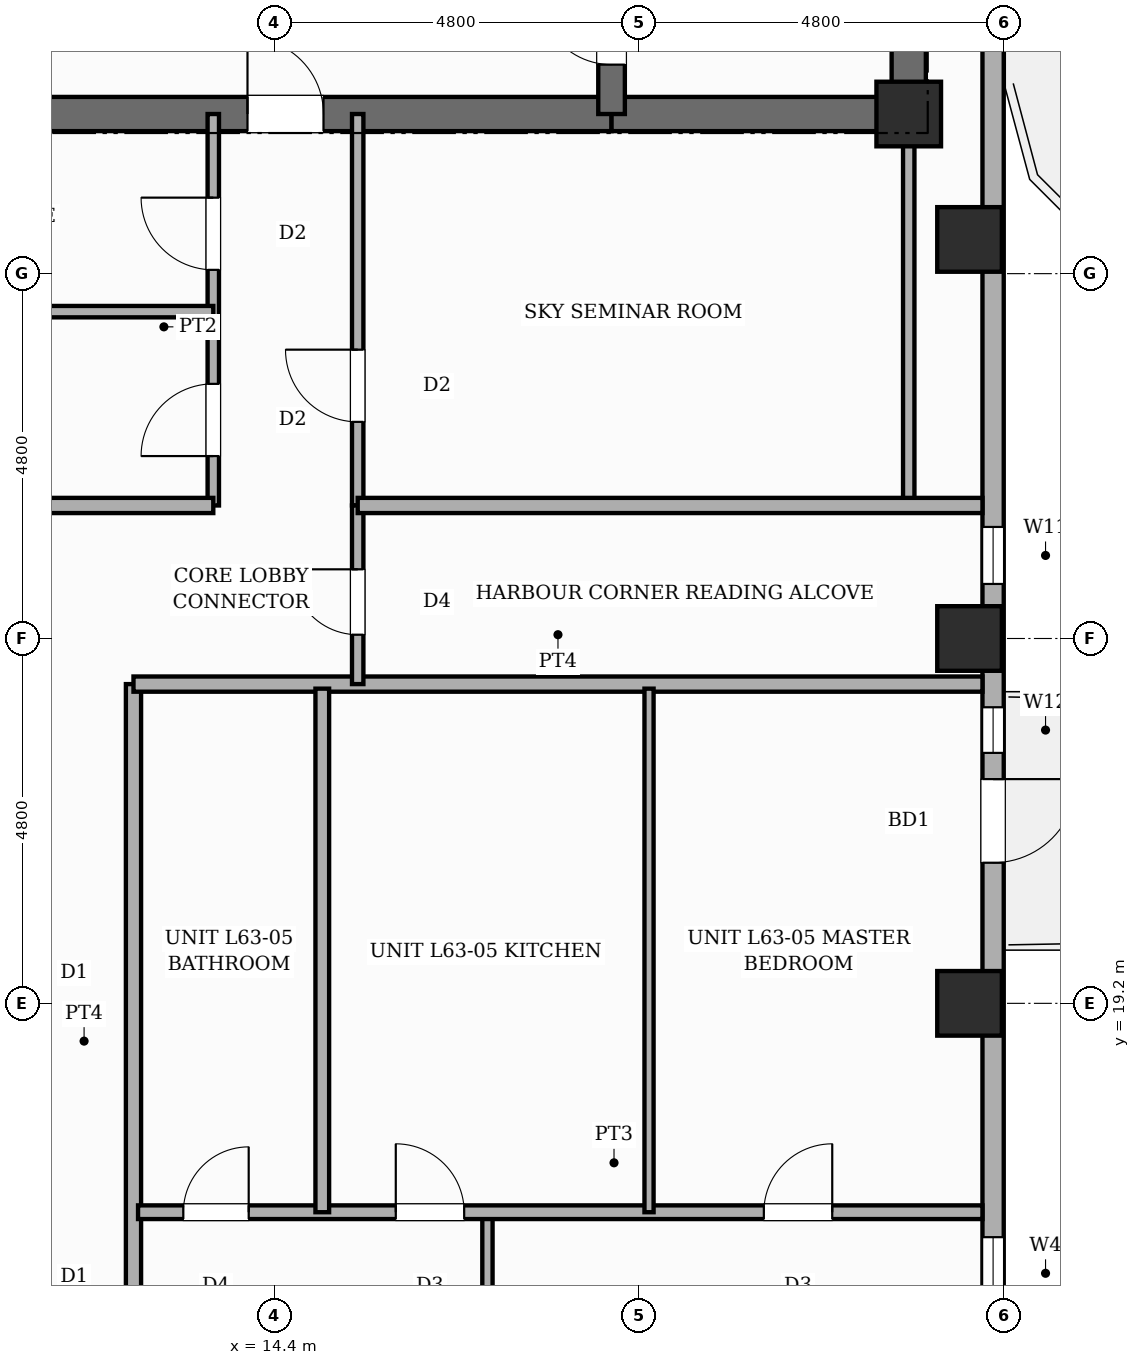
"""IFC4 building model, lengths in metres.
Left out: names, types, materials, properties, quantities, classifications, styles, units other than length and angle.
Written with IfcOpenShell. Run it as: python <this file> out.ifc"""

import sys

from ifc_helpers import new_model, si_unit, direction, frame, frame_2d, origin, origin_2d, place, context, subcontext, project, spatial, rectangle, extrude, element, fill, save


model = new_model("IFC4")
c1 = context("Model", 3, precision=1e-05, world=origin(), true_north=direction((0.0, 1.0)))
c2 = subcontext(c1, "Body", "Model", "MODEL_VIEW")
j1 = project(units=[si_unit("LENGTHUNIT", "METRE"), si_unit("PLANEANGLEUNIT", "RADIAN")], contexts=[c1])
p1 = place(None, origin())
s1 = spatial("IfcSite", under=j1, at=p1, CompositionType="ELEMENT")
p2 = place(p1, origin())
s2 = spatial("IfcBuilding", under=s1, at=p2, CompositionType="ELEMENT")
p3 = place(p2, frame((0.0, 0.0, 239.8)))
s3 = spatial("IfcBuildingStorey", under=s2, at=p3, CompositionType="ELEMENT", Elevation=239.8)
p4 = place(p3, frame((22.75, 30.675, 0.0), z_axis=(0.0, 0.0, 1.0), x_axis=(0.0, 1.0, 0.0)))
e1 = element("IfcWall", 1, at=p4, inside=s3, PredefinedType="SHEAR", context=c2, shape_type="SweptSolid", body=[
    extrude(rectangle(XDim=15.35, YDim=0.45, at=frame_2d((7.675, 0.0))), origin(), (0.0, 0.0, 1.0), 4.3),
])
p5 = place(p3, frame((9.96, 30.9, 0.0), z_axis=(0.0, 0.0, 1.0), x_axis=(1.0, 0.0, 0.0)))
e2 = element("IfcWall", 2, at=p5, inside=s3, PredefinedType="SHEAR", context=c2, shape_type="SweptSolid", body=[
    extrude(rectangle(XDim=8.88, YDim=0.45, at=frame_2d((4.44, 0.0))), origin(), (0.0, 0.0, 1.0), 4.3),
])
p6 = place(p5, frame((4.09, 0.0, 0.0)))
e3 = element("IfcOpeningElement", 3, at=p6, cuts=e2, PredefinedType="OPENING", context=c2, shape_type="SweptSolid", body=[
    extrude(rectangle(XDim=1.0, YDim=2.15, at=frame_2d((0.5, 1.075))), frame((0.0, 0.235, 0.0), z_axis=(0.0, -1.0, 0.0), x_axis=(1.0, 0.0, 0.0)), (0.0, 0.0, 1.0), 0.47),
])
p7 = place(p3, frame((18.84, 30.9, 0.0), z_axis=(0.0, 0.0, 1.0), x_axis=(1.0, 0.0, 0.0)))
e4 = element("IfcWall", 4, at=p7, inside=s3, PredefinedType="SHEAR", context=c2, shape_type="SweptSolid", body=[
    extrude(rectangle(XDim=3.91, YDim=0.45, at=frame_2d((1.955, 0.0))), origin(), (0.0, 0.0, 1.0), 4.3),
])
p8 = place(p3, frame((18.84, 30.9, 0.0), z_axis=(0.0, 0.0, 1.0), x_axis=(0.0, 1.0, 0.0)))
e5 = element("IfcWall", 5, at=p8, inside=s3, PredefinedType="SHEAR", context=c2, shape_type="SweptSolid", body=[
    extrude(rectangle(XDim=14.9, YDim=0.35, at=frame_2d((7.45, 0.0))), origin(), (0.0, 0.0, 1.0), 4.3),
])
p9 = place(p8, frame((0.65, 0.0, 0.0)))
e6 = element("IfcOpeningElement", 6, at=p9, cuts=e5, PredefinedType="OPENING", context=c2, shape_type="SweptSolid", body=[
    extrude(rectangle(XDim=0.95, YDim=2.1, at=frame_2d((0.475, 1.05))), frame((0.0, 0.185, 0.0), z_axis=(0.0, -1.0, 0.0), x_axis=(1.0, 0.0, 0.0)), (0.0, 0.0, 1.0), 0.37),
])
p10 = place(p8, frame((10.45, 0.0, 0.0)))
e7 = element("IfcOpeningElement", 7, at=p10, cuts=e5, PredefinedType="OPENING", context=c2, shape_type="SweptSolid", body=[
    extrude(rectangle(XDim=1.0, YDim=2.15, at=frame_2d((0.5, 1.075))), frame((0.0, 0.185, 0.0), z_axis=(0.0, -1.0, 0.0), x_axis=(1.0, 0.0, 0.0)), (0.0, 0.0, 1.0), 0.37),
])
for number, where, z_axis, x_axis in (
    (8, (22.75, 30.9, 0.0), (0.0, 0.0, 1.0), (1.0, 0.0, 0.0)),
    (9, (23.55, 19.2, 0.0), (0.0, 0.0, 1.0), (1.0, 0.0, 0.0)),
    (10, (23.55, 24.0, 0.0), (0.0, 0.0, 1.0), (1.0, 0.0, 0.0)),
    (11, (23.55, 29.25, 0.0), (0.0, 0.0, 1.0), (1.0, 0.0, 0.0)),
):
    element("IfcColumn", number, at=place(p3, frame(where, z_axis=z_axis, x_axis=x_axis)), inside=s3, PredefinedType="COLUMN", context=c2, shape_type="SweptSolid", body=[
        extrude(rectangle(XDim=0.85, YDim=0.85, at=origin_2d()), origin(), (0.0, 0.0, 1.0), 4.3),
    ])
p11 = place(p3, frame((23.86, 45.6, 0.0), z_axis=(0.0, 0.0, 1.0), x_axis=(0.0, -1.0, 0.0)))
e12 = element("IfcWall", 12, at=p11, inside=s3, PredefinedType="STANDARD", context=c2, shape_type="SweptSolid", body=[
    extrude(rectangle(XDim=33.6, YDim=0.28, at=frame_2d((16.8, 0.0))), origin(), (0.0, 0.0, 1.0), 3.32),
])
p12 = place(p11, frame((3.5, 0.0, 0.0)))
e13 = element("IfcOpeningElement", 13, at=p12, cuts=e12, PredefinedType="OPENING", context=c2, shape_type="SweptSolid", body=[
    extrude(rectangle(XDim=1.3, YDim=2.2, at=frame_2d((0.65, 1.1))), frame((0.0, 0.15, 0.0), z_axis=(0.0, -1.0, 0.0), x_axis=(1.0, 0.0, 0.0)), (0.0, 0.0, 1.0), 0.3),
])
p13 = place(p11, frame((23.45, 0.0, 0.0)))
e14 = element("IfcOpeningElement", 14, at=p13, cuts=e12, PredefinedType="OPENING", context=c2, shape_type="SweptSolid", body=[
    extrude(rectangle(XDim=1.1, YDim=2.15, at=frame_2d((0.55, 1.075))), frame((0.0, 0.15, 0.0), z_axis=(0.0, -1.0, 0.0), x_axis=(1.0, 0.0, 0.0)), (0.0, 0.0, 1.0), 0.3),
])
p14 = place(p11, frame((22.505, 0.0, 0.45)))
e15 = element("IfcOpeningElement", 15, at=p14, cuts=e12, PredefinedType="OPENING", context=c2, shape_type="SweptSolid", body=[
    extrude(rectangle(XDim=0.6, YDim=1.8, at=frame_2d((0.3, 0.9))), frame((0.0, 0.15, 0.0), z_axis=(0.0, -1.0, 0.0), x_axis=(1.0, 0.0, 0.0)), (0.0, 0.0, 1.0), 0.3),
])
p15 = place(p11, frame((0.407, 0.0, 0.8)))
e16 = element("IfcOpeningElement", 16, at=p15, cuts=e12, PredefinedType="OPENING", context=c2, shape_type="SweptSolid", body=[
    extrude(rectangle(XDim=1.2, YDim=1.8, at=frame_2d((0.6, 0.9))), frame((0.0, 0.15, 0.0), z_axis=(0.0, -1.0, 0.0), x_axis=(1.0, 0.0, 0.0)), (0.0, 0.0, 1.0), 0.3),
])
p16 = place(p11, frame((29.477, 0.0, 0.8)))
e17 = element("IfcOpeningElement", 17, at=p16, cuts=e12, PredefinedType="OPENING", context=c2, shape_type="SweptSolid", body=[
    extrude(rectangle(XDim=0.95, YDim=1.8, at=frame_2d((0.475, 0.9))), frame((0.0, 0.15, 0.0), z_axis=(0.0, -1.0, 0.0), x_axis=(1.0, 0.0, 0.0)), (0.0, 0.0, 1.0), 0.3),
])
p17 = place(p11, frame((20.133, 0.0, 0.45)))
e18 = element("IfcOpeningElement", 18, at=p17, cuts=e12, PredefinedType="OPENING", context=c2, shape_type="SweptSolid", body=[
    extrude(rectangle(XDim=0.75, YDim=1.8, at=frame_2d((0.375, 0.9))), frame((0.0, 0.15, 0.0), z_axis=(0.0, -1.0, 0.0), x_axis=(1.0, 0.0, 0.0)), (0.0, 0.0, 1.0), 0.3),
])
p18 = place(p3, frame((13.6, 25.75, 0.0), z_axis=(0.0, 0.0, 1.0), x_axis=(0.0, 1.0, 0.0)))
e19 = element("IfcWall", 19, at=p18, inside=s3, PredefinedType="PARTITIONING", context=c2, shape_type="SweptSolid", body=[
    extrude(rectangle(XDim=5.15, YDim=0.15, at=frame_2d((2.575, 0.0))), origin(), (0.0, 0.0, 1.0), 4.04),
])
p19 = place(p18, frame((0.65, 0.0, 0.0)))
e20 = element("IfcOpeningElement", 20, at=p19, cuts=e19, PredefinedType="OPENING", context=c2, shape_type="SweptSolid", body=[
    extrude(rectangle(XDim=0.95, YDim=2.15, at=frame_2d((0.475, 1.075))), frame((0.0, 0.085, 0.0), z_axis=(0.0, -1.0, 0.0), x_axis=(1.0, 0.0, 0.0)), (0.0, 0.0, 1.0), 0.17),
])
p20 = place(p18, frame((3.1, 0.0, 0.0)))
e21 = element("IfcOpeningElement", 21, at=p20, cuts=e19, PredefinedType="OPENING", context=c2, shape_type="SweptSolid", body=[
    extrude(rectangle(XDim=0.95, YDim=2.15, at=frame_2d((0.475, 1.075))), frame((0.0, 0.085, 0.0), z_axis=(0.0, -1.0, 0.0), x_axis=(1.0, 0.0, 0.0)), (0.0, 0.0, 1.0), 0.17),
])
p21 = place(p3, frame((15.5, 25.75, 0.0), z_axis=(0.0, 0.0, 1.0), x_axis=(0.0, 1.0, 0.0)))
e22 = element("IfcWall", 22, at=p21, inside=s3, PredefinedType="PARTITIONING", context=c2, shape_type="SweptSolid", body=[
    extrude(rectangle(XDim=5.15, YDim=0.15, at=frame_2d((2.575, 0.0))), origin(), (0.0, 0.0, 1.0), 4.04),
])
p22 = place(p21, frame((1.1, 0.0, 0.0)))
e23 = element("IfcOpeningElement", 23, at=p22, cuts=e22, PredefinedType="OPENING", context=c2, shape_type="SweptSolid", body=[
    extrude(rectangle(XDim=0.95, YDim=2.15, at=frame_2d((0.475, 1.075))), frame((0.0, 0.085, 0.0), z_axis=(0.0, -1.0, 0.0), x_axis=(1.0, 0.0, 0.0)), (0.0, 0.0, 1.0), 0.17),
])
p23 = place(p3, frame((22.75, 25.75, 0.0), z_axis=(0.0, 0.0, 1.0), x_axis=(0.0, 1.0, 0.0)))
e24 = element("IfcWall", 24, at=p23, inside=s3, PredefinedType="PARTITIONING", context=c2, shape_type="SweptSolid", body=[
    extrude(rectangle(XDim=5.15, YDim=0.15, at=frame_2d((2.575, 0.0))), origin(), (0.0, 0.0, 1.0), 4.04),
])
p24 = place(p3, frame((6.05, 28.3, 0.0), z_axis=(0.0, 0.0, 1.0), x_axis=(1.0, 0.0, 0.0)))
e25 = element("IfcWall", 25, at=p24, inside=s3, PredefinedType="PARTITIONING", context=c2, shape_type="SweptSolid", body=[
    extrude(rectangle(XDim=7.55, YDim=0.15, at=frame_2d((3.775, 0.0))), origin(), (0.0, 0.0, 1.0), 4.04),
])
p25 = place(p3, frame((12.55, 9.88, 0.0), z_axis=(0.0, 0.0, 1.0), x_axis=(0.0, 1.0, 0.0)))
e26 = element("IfcWall", 26, at=p25, inside=s3, PredefinedType="PARTITIONING", context=c2, shape_type="SweptSolid", body=[
    extrude(rectangle(XDim=13.52, YDim=0.2, at=frame_2d((6.76, 0.0))), origin(), (0.0, 0.0, 1.0), 4.04),
])
p26 = place(p25, frame((2.796, 0.0, 0.0)))
e27 = element("IfcOpeningElement", 27, at=p26, cuts=e26, PredefinedType="OPENING", context=c2, shape_type="SweptSolid", body=[
    extrude(rectangle(XDim=0.98, YDim=2.18, at=frame_2d((0.49, 1.09))), frame((0.0, 0.11, 0.0), z_axis=(0.0, -1.0, 0.0), x_axis=(1.0, 0.0, 0.0)), (0.0, 0.0, 1.0), 0.22),
])
p27 = place(p3, frame((12.55, 23.4, 0.0), z_axis=(0.0, 0.0, 1.0), x_axis=(1.0, 0.0, 0.0)))
e28 = element("IfcWall", 28, at=p27, inside=s3, PredefinedType="PARTITIONING", context=c2, shape_type="SweptSolid", body=[
    extrude(rectangle(XDim=11.17, YDim=0.2, at=frame_2d((5.585, 0.0))), origin(), (0.0, 0.0, 1.0), 4.04),
])
p28 = place(p3, frame((5.08, 25.75, 0.0), z_axis=(0.0, 0.0, 1.0), x_axis=(1.0, 0.0, 0.0)))
e29 = element("IfcWall", 29, at=p28, inside=s3, PredefinedType="PARTITIONING", context=c2, shape_type="SweptSolid", body=[
    extrude(rectangle(XDim=8.52, YDim=0.2, at=frame_2d((4.26, 0.0))), origin(), (0.0, 0.0, 1.0), 4.04),
])
p29 = place(p3, frame((15.5, 23.4, 0.0), z_axis=(0.0, 0.0, 1.0), x_axis=(0.0, 1.0, 0.0)))
e30 = element("IfcWall", 30, at=p29, inside=s3, PredefinedType="PARTITIONING", context=c2, shape_type="SweptSolid", body=[
    extrude(rectangle(XDim=2.35, YDim=0.15, at=frame_2d((1.175, 0.0))), origin(), (0.0, 0.0, 1.0), 4.04),
])
p30 = place(p29, frame((0.65, 0.0, 0.0)))
e31 = element("IfcOpeningElement", 31, at=p30, cuts=e30, PredefinedType="OPENING", context=c2, shape_type="SweptSolid", body=[
    extrude(rectangle(XDim=0.86, YDim=2.1, at=frame_2d((0.43, 1.05))), frame((0.0, 0.085, 0.0), z_axis=(0.0, -1.0, 0.0), x_axis=(1.0, 0.0, 0.0)), (0.0, 0.0, 1.0), 0.17),
])
p31 = place(p3, frame((15.5, 25.75, 0.0), z_axis=(0.0, 0.0, 1.0), x_axis=(1.0, 0.0, 0.0)))
e32 = element("IfcWall", 32, at=p31, inside=s3, PredefinedType="PARTITIONING", context=c2, shape_type="SweptSolid", body=[
    extrude(rectangle(XDim=8.22, YDim=0.2, at=frame_2d((4.11, 0.0))), origin(), (0.0, 0.0, 1.0), 4.04),
])
p32 = place(p3, frame((17.207, 9.88, 0.0), z_axis=(0.0, 0.0, 1.0), x_axis=(0.0, 1.0, 0.0)))
e33 = element("IfcWall", 33, at=p32, inside=s3, PredefinedType="PARTITIONING", context=c2, shape_type="SweptSolid", body=[
    extrude(rectangle(XDim=6.572, YDim=0.135, at=frame_2d((3.286, 0.0))), origin(), (0.0, 0.0, 1.0), 4.04),
])
p33 = place(p32, frame((2.472, 0.0, 0.0)))
e34 = element("IfcOpeningElement", 34, at=p33, cuts=e33, PredefinedType="OPENING", context=c2, shape_type="SweptSolid", body=[
    extrude(rectangle(XDim=0.9, YDim=2.15, at=frame_2d((0.45, 1.075))), frame((0.0, 0.078, 0.0), z_axis=(0.0, -1.0, 0.0), x_axis=(1.0, 0.0, 0.0)), (0.0, 0.0, 1.0), 0.155),
])
p34 = place(p3, frame((12.61, 16.452, 0.0), z_axis=(0.0, 0.0, 1.0), x_axis=(1.0, 0.0, 0.0)))
e35 = element("IfcWall", 35, at=p34, inside=s3, PredefinedType="PLUMBINGWALL", context=c2, shape_type="SweptSolid", body=[
    extrude(rectangle(XDim=11.11, YDim=0.18, at=frame_2d((5.555, 0.0))), origin(), (0.0, 0.0, 1.0), 4.04),
])
p35 = place(p34, frame((0.596, 0.0, 0.0)))
e36 = element("IfcOpeningElement", 36, at=p35, cuts=e35, PredefinedType="OPENING", context=c2, shape_type="SweptSolid", body=[
    extrude(rectangle(XDim=0.86, YDim=2.1, at=frame_2d((0.43, 1.05))), frame((0.0, 0.1, 0.0), z_axis=(0.0, -1.0, 0.0), x_axis=(1.0, 0.0, 0.0)), (0.0, 0.0, 1.0), 0.2),
])
p36 = place(p34, frame((3.391, 0.0, 0.0)))
e37 = element("IfcOpeningElement", 37, at=p36, cuts=e35, PredefinedType="OPENING", context=c2, shape_type="SweptSolid", body=[
    extrude(rectangle(XDim=0.9, YDim=2.15, at=frame_2d((0.45, 1.075))), frame((0.0, 0.1, 0.0), z_axis=(0.0, -1.0, 0.0), x_axis=(1.0, 0.0, 0.0)), (0.0, 0.0, 1.0), 0.2),
])
p37 = place(p34, frame((8.234, 0.0, 0.0)))
e38 = element("IfcOpeningElement", 38, at=p37, cuts=e35, PredefinedType="OPENING", context=c2, shape_type="SweptSolid", body=[
    extrude(rectangle(XDim=0.9, YDim=2.15, at=frame_2d((0.45, 1.075))), frame((0.0, 0.1, 0.0), z_axis=(0.0, -1.0, 0.0), x_axis=(1.0, 0.0, 0.0)), (0.0, 0.0, 1.0), 0.2),
])
p38 = place(p3, frame((15.034, 16.452, 0.0), z_axis=(0.0, 0.0, 1.0), x_axis=(0.0, 1.0, 0.0)))
e39 = element("IfcWall", 39, at=p38, inside=s3, PredefinedType="PLUMBINGWALL", context=c2, shape_type="SweptSolid", body=[
    extrude(rectangle(XDim=6.888, YDim=0.18, at=frame_2d((3.444, 0.0))), origin(), (0.0, 0.0, 1.0), 4.04),
])
p39 = place(p3, frame((19.333, 16.452, 0.0), z_axis=(0.0, 0.0, 1.0), x_axis=(0.0, 1.0, 0.0)))
e40 = element("IfcWall", 40, at=p39, inside=s3, PredefinedType="PARTITIONING", context=c2, shape_type="SweptSolid", body=[
    extrude(rectangle(XDim=6.888, YDim=0.12, at=frame_2d((3.444, 0.0))), origin(), (0.0, 0.0, 1.0), 4.04),
])
p40 = place(p13, origin())
e41 = element("IfcDoor", 41, at=p40, inside=s3, OperationType="SINGLE_SWING_LEFT", PredefinedType="DOOR", context=c2, shape_type="SweptSolid", body=[
    extrude(rectangle(XDim=1.1, YDim=2.15, at=frame_2d((0.55, 1.075))), frame((0.0, 0.025, 0.0), z_axis=(0.0, -1.0, 0.0), x_axis=(1.0, 0.0, 0.0)), (0.0, 0.0, 1.0), 0.05),
])
fill(e14, e41)
p41 = place(p14, origin())
e42 = element("IfcWindow", 42, at=p41, inside=s3, PartitioningType="SINGLE_PANEL", PredefinedType="WINDOW", context=c2, shape_type="SweptSolid", body=[
    extrude(rectangle(XDim=0.6, YDim=1.8, at=frame_2d((0.3, 0.9))), frame((0.0, 0.03, 0.0), z_axis=(0.0, -1.0, 0.0), x_axis=(1.0, 0.0, 0.0)), (0.0, 0.0, 1.0), 0.06),
])
fill(e15, e42)
p42 = place(p16, origin())
e43 = element("IfcWindow", 43, at=p42, inside=s3, PartitioningType="SINGLE_PANEL", PredefinedType="WINDOW", context=c2, shape_type="SweptSolid", body=[
    extrude(rectangle(XDim=0.95, YDim=1.8, at=frame_2d((0.475, 0.9))), frame((0.0, 0.03, 0.0), z_axis=(0.0, -1.0, 0.0), x_axis=(1.0, 0.0, 0.0)), (0.0, 0.0, 1.0), 0.06),
])
fill(e17, e43)
p43 = place(p17, origin())
e44 = element("IfcWindow", 44, at=p43, inside=s3, PartitioningType="SINGLE_PANEL", PredefinedType="WINDOW", context=c2, shape_type="SweptSolid", body=[
    extrude(rectangle(XDim=0.75, YDim=1.8, at=frame_2d((0.375, 0.9))), frame((0.0, 0.03, 0.0), z_axis=(0.0, -1.0, 0.0), x_axis=(1.0, 0.0, 0.0)), (0.0, 0.0, 1.0), 0.06),
])
fill(e18, e44)
p44 = place(p9, origin())
e45 = element("IfcDoor", 45, at=p44, inside=s3, OperationType="SINGLE_SWING_RIGHT", PredefinedType="DOOR", context=c2, shape_type="SweptSolid", body=[
    extrude(rectangle(XDim=0.95, YDim=2.1, at=frame_2d((0.475, 1.05))), frame((0.0, 0.025, 0.0), z_axis=(0.0, -1.0, 0.0), x_axis=(1.0, 0.0, 0.0)), (0.0, 0.0, 1.0), 0.05),
])
fill(e6, e45)
p45 = place(p6, origin())
e46 = element("IfcDoor", 46, at=p45, inside=s3, OperationType="SINGLE_SWING_LEFT", PredefinedType="DOOR", context=c2, shape_type="SweptSolid", body=[
    extrude(rectangle(XDim=1.0, YDim=2.15, at=frame_2d((0.5, 1.075))), frame((0.0, 0.025, 0.0), z_axis=(0.0, -1.0, 0.0), x_axis=(1.0, 0.0, 0.0)), (0.0, 0.0, 1.0), 0.05),
])
fill(e3, e46)
p46 = place(p19, origin())
e47 = element("IfcDoor", 47, at=p46, inside=s3, OperationType="SINGLE_SWING_LEFT", PredefinedType="DOOR", context=c2, shape_type="SweptSolid", body=[
    extrude(rectangle(XDim=0.95, YDim=2.15, at=frame_2d((0.475, 1.075))), frame((0.0, 0.025, 0.0), z_axis=(0.0, -1.0, 0.0), x_axis=(1.0, 0.0, 0.0)), (0.0, 0.0, 1.0), 0.05),
])
fill(e20, e47)
p47 = place(p20, origin())
e48 = element("IfcDoor", 48, at=p47, inside=s3, OperationType="SINGLE_SWING_RIGHT", PredefinedType="DOOR", context=c2, shape_type="SweptSolid", body=[
    extrude(rectangle(XDim=0.95, YDim=2.15, at=frame_2d((0.475, 1.075))), frame((0.0, 0.025, 0.0), z_axis=(0.0, -1.0, 0.0), x_axis=(1.0, 0.0, 0.0)), (0.0, 0.0, 1.0), 0.05),
])
fill(e21, e48)
p48 = place(p22, origin())
e49 = element("IfcDoor", 49, at=p48, inside=s3, OperationType="SINGLE_SWING_RIGHT", PredefinedType="DOOR", context=c2, shape_type="SweptSolid", body=[
    extrude(rectangle(XDim=0.95, YDim=2.15, at=frame_2d((0.475, 1.075))), frame((0.0, 0.025, 0.0), z_axis=(0.0, -1.0, 0.0), x_axis=(1.0, 0.0, 0.0)), (0.0, 0.0, 1.0), 0.05),
])
fill(e23, e49)
p49 = place(p30, origin())
e50 = element("IfcDoor", 50, at=p49, inside=s3, OperationType="SINGLE_SWING_RIGHT", PredefinedType="DOOR", context=c2, shape_type="SweptSolid", body=[
    extrude(rectangle(XDim=0.86, YDim=2.1, at=frame_2d((0.43, 1.05))), frame((0.0, 0.025, 0.0), z_axis=(0.0, -1.0, 0.0), x_axis=(1.0, 0.0, 0.0)), (0.0, 0.0, 1.0), 0.05),
])
fill(e31, e50)
p50 = place(p35, origin())
e51 = element("IfcDoor", 51, at=p50, inside=s3, OperationType="SINGLE_SWING_RIGHT", PredefinedType="DOOR", context=c2, shape_type="SweptSolid", body=[
    extrude(rectangle(XDim=0.86, YDim=2.1, at=frame_2d((0.43, 1.05))), frame((0.0, 0.025, 0.0), z_axis=(0.0, -1.0, 0.0), x_axis=(1.0, 0.0, 0.0)), (0.0, 0.0, 1.0), 0.05),
])
fill(e36, e51)
p51 = place(p36, origin())
e52 = element("IfcDoor", 52, at=p51, inside=s3, OperationType="SINGLE_SWING_LEFT", PredefinedType="DOOR", context=c2, shape_type="SweptSolid", body=[
    extrude(rectangle(XDim=0.9, YDim=2.15, at=frame_2d((0.45, 1.075))), frame((0.0, 0.025, 0.0), z_axis=(0.0, -1.0, 0.0), x_axis=(1.0, 0.0, 0.0)), (0.0, 0.0, 1.0), 0.05),
])
fill(e37, e52)
p52 = place(p37, origin())
e53 = element("IfcDoor", 53, at=p52, inside=s3, OperationType="SINGLE_SWING_RIGHT", PredefinedType="DOOR", context=c2, shape_type="SweptSolid", body=[
    extrude(rectangle(XDim=0.9, YDim=2.15, at=frame_2d((0.45, 1.075))), frame((0.0, 0.025, 0.0), z_axis=(0.0, -1.0, 0.0), x_axis=(1.0, 0.0, 0.0)), (0.0, 0.0, 1.0), 0.05),
])
fill(e38, e53)
save(model, sys.argv[1])
